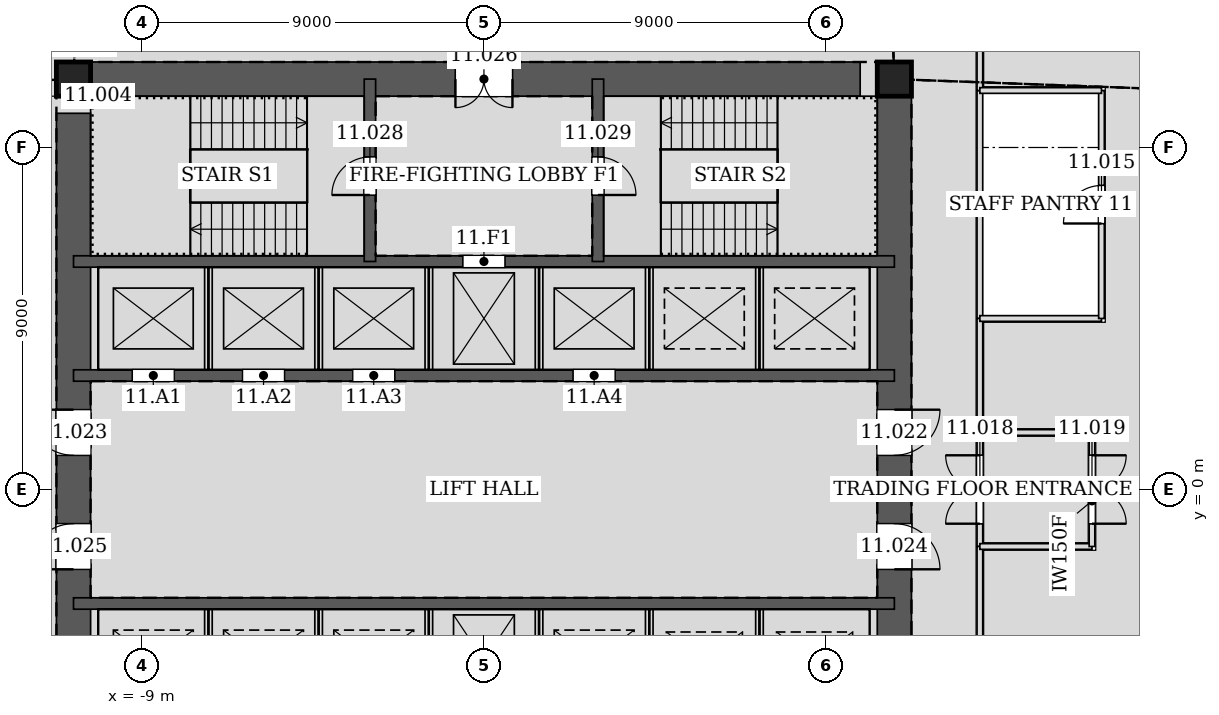
"""IFC4 building model, lengths in metres.
Left out: names, types, materials, properties, quantities, classifications, styles, units other than length and angle.
Written with IfcOpenShell. Run it as: python <this file> out.ifc"""

import sys

from ifc_helpers import new_model, si_unit, direction, frame, frame_2d, origin, origin_2d, place, context, subcontext, project, spatial, rectangle, hollow_rectangle, extrude, element, fill, save


model = new_model("IFC4")
c1 = context("Model", 3, precision=1e-05, world=origin(), true_north=direction((0.0, 1.0)))
c2 = subcontext(c1, "Body", "Model", "MODEL_VIEW")
j1 = project(units=[si_unit("LENGTHUNIT", "METRE"), si_unit("PLANEANGLEUNIT", "RADIAN")], contexts=[c1])
p1 = place(None, origin())
s1 = spatial("IfcSite", under=j1, at=p1, CompositionType="ELEMENT")
p2 = place(p1, origin())
s2 = spatial("IfcBuilding", under=s1, at=p2, CompositionType="ELEMENT")
p3 = place(p2, frame((0.0, 0.0, 54.0)))
s3 = spatial("IfcBuildingStorey", under=s2, at=p3, CompositionType="ELEMENT", Elevation=54.0)
for number, where, z_axis, x_axis in (
    (1, (10.8, 10.8, 0.0), (0.0, 0.0, 1.0), (1.0, 0.0, 0.0)),
    (2, (-10.8, 10.8, 0.0), (0.0, 0.0, 1.0), (1.0, 0.0, 0.0)),
):
    element("IfcColumn", number, at=place(p3, frame(where, z_axis=z_axis, x_axis=x_axis)), inside=s3, PredefinedType="COLUMN", context=c2, shape_type="SweptSolid", body=[
        extrude(hollow_rectangle(XDim=0.9, YDim=0.9, WallThickness=0.06, at=origin_2d()), origin(), (0.0, 0.0, 1.0), 4.2),
    ])
p4 = place(p3, frame((10.8, -10.8, 0.0), z_axis=(0.0, 0.0, 1.0), x_axis=(0.0, 1.0, 0.0)))
e3 = element("IfcWall", 3, at=p4, inside=s3, PredefinedType="SOLIDWALL", context=c2, shape_type="SweptSolid", body=[
    extrude(rectangle(XDim=21.6, YDim=0.9, at=frame_2d((10.8, 0.0))), origin(), (0.0, 0.0, 1.0), 4.2),
])
p5 = place(p4, frame((11.7, 0.0, 0.0)))
e4 = element("IfcOpeningElement", 4, at=p5, cuts=e3, PredefinedType="OPENING", context=c2, shape_type="SweptSolid", body=[
    extrude(rectangle(XDim=1.2, YDim=2.1, at=frame_2d((0.6, 1.05))), frame((0.0, 0.46, 0.0), z_axis=(0.0, -1.0, 0.0), x_axis=(1.0, 0.0, 0.0)), (0.0, 0.0, 1.0), 0.92),
])
p6 = place(p4, frame((8.7, 0.0, 0.0)))
e5 = element("IfcOpeningElement", 5, at=p6, cuts=e3, PredefinedType="OPENING", context=c2, shape_type="SweptSolid", body=[
    extrude(rectangle(XDim=1.2, YDim=2.1, at=frame_2d((0.6, 1.05))), frame((0.0, 0.46, 0.0), z_axis=(0.0, -1.0, 0.0), x_axis=(1.0, 0.0, 0.0)), (0.0, 0.0, 1.0), 0.92),
])
p7 = place(p3, frame((10.8, 10.8, 0.0), z_axis=(0.0, 0.0, 1.0), x_axis=(-1.0, 0.0, 0.0)))
e6 = element("IfcWall", 6, at=p7, inside=s3, PredefinedType="SOLIDWALL", context=c2, shape_type="SweptSolid", body=[
    extrude(rectangle(XDim=21.6, YDim=0.9, at=frame_2d((10.8, 0.0))), origin(), (0.0, 0.0, 1.0), 4.2),
])
p8 = place(p7, frame((10.05, 0.0, 0.0)))
e7 = element("IfcOpeningElement", 7, at=p8, cuts=e6, PredefinedType="OPENING", context=c2, shape_type="SweptSolid", body=[
    extrude(rectangle(XDim=1.5, YDim=2.1, at=frame_2d((0.75, 1.05))), frame((0.0, 0.46, 0.0), z_axis=(0.0, -1.0, 0.0), x_axis=(1.0, 0.0, 0.0)), (0.0, 0.0, 1.0), 0.92),
])
p9 = place(p3, frame((-10.8, 10.8, 0.0), z_axis=(0.0, 0.0, 1.0), x_axis=(0.0, -1.0, 0.0)))
e8 = element("IfcWall", 8, at=p9, inside=s3, PredefinedType="SOLIDWALL", context=c2, shape_type="SweptSolid", body=[
    extrude(rectangle(XDim=21.6, YDim=0.9, at=frame_2d((10.8, 0.0))), origin(), (0.0, 0.0, 1.0), 4.2),
])
p10 = place(p9, frame((8.7, 0.0, 0.0)))
e9 = element("IfcOpeningElement", 9, at=p10, cuts=e8, PredefinedType="OPENING", context=c2, shape_type="SweptSolid", body=[
    extrude(rectangle(XDim=1.2, YDim=2.1, at=frame_2d((0.6, 1.05))), frame((0.0, 0.46, 0.0), z_axis=(0.0, -1.0, 0.0), x_axis=(1.0, 0.0, 0.0)), (0.0, 0.0, 1.0), 0.92),
])
p11 = place(p9, frame((11.7, 0.0, 0.0)))
e10 = element("IfcOpeningElement", 10, at=p11, cuts=e8, PredefinedType="OPENING", context=c2, shape_type="SweptSolid", body=[
    extrude(rectangle(XDim=1.2, YDim=2.1, at=frame_2d((0.6, 1.05))), frame((0.0, 0.46, 0.0), z_axis=(0.0, -1.0, 0.0), x_axis=(1.0, 0.0, 0.0)), (0.0, 0.0, 1.0), 0.92),
])
p12 = place(p3, frame((-10.8, 3.0, 0.0), z_axis=(0.0, 0.0, 1.0), x_axis=(1.0, 0.0, 0.0)))
e11 = element("IfcWall", 11, at=p12, inside=s3, PredefinedType="SOLIDWALL", context=c2, shape_type="SweptSolid", body=[
    extrude(rectangle(XDim=21.6, YDim=0.3, at=frame_2d((10.8, 0.0))), origin(), (0.0, 0.0, 1.0), 4.2),
])
p13 = place(p12, frame((1.55, 0.0, 0.0)))
e12 = element("IfcOpeningElement", 12, at=p13, cuts=e11, PredefinedType="OPENING", context=c2, shape_type="SweptSolid", body=[
    extrude(rectangle(XDim=1.1, YDim=2.1, at=frame_2d((0.55, 1.05))), frame((0.0, 0.16, 0.0), z_axis=(0.0, -1.0, 0.0), x_axis=(1.0, 0.0, 0.0)), (0.0, 0.0, 1.0), 0.32),
])
p14 = place(p12, frame((4.45, 0.0, 0.0)))
e13 = element("IfcOpeningElement", 13, at=p14, cuts=e11, PredefinedType="OPENING", context=c2, shape_type="SweptSolid", body=[
    extrude(rectangle(XDim=1.1, YDim=2.1, at=frame_2d((0.55, 1.05))), frame((0.0, 0.16, 0.0), z_axis=(0.0, -1.0, 0.0), x_axis=(1.0, 0.0, 0.0)), (0.0, 0.0, 1.0), 0.32),
])
p15 = place(p12, frame((7.35, 0.0, 0.0)))
e14 = element("IfcOpeningElement", 14, at=p15, cuts=e11, PredefinedType="OPENING", context=c2, shape_type="SweptSolid", body=[
    extrude(rectangle(XDim=1.1, YDim=2.1, at=frame_2d((0.55, 1.05))), frame((0.0, 0.16, 0.0), z_axis=(0.0, -1.0, 0.0), x_axis=(1.0, 0.0, 0.0)), (0.0, 0.0, 1.0), 0.32),
])
p16 = place(p12, frame((13.15, 0.0, 0.0)))
e15 = element("IfcOpeningElement", 15, at=p16, cuts=e11, PredefinedType="OPENING", context=c2, shape_type="SweptSolid", body=[
    extrude(rectangle(XDim=1.1, YDim=2.1, at=frame_2d((0.55, 1.05))), frame((0.0, 0.16, 0.0), z_axis=(0.0, -1.0, 0.0), x_axis=(1.0, 0.0, 0.0)), (0.0, 0.0, 1.0), 0.32),
])
p17 = place(p3, frame((-10.8, 6.0, 0.0), z_axis=(0.0, 0.0, 1.0), x_axis=(1.0, 0.0, 0.0)))
e16 = element("IfcWall", 16, at=p17, inside=s3, PredefinedType="SOLIDWALL", context=c2, shape_type="SweptSolid", body=[
    extrude(rectangle(XDim=21.6, YDim=0.3, at=frame_2d((10.8, 0.0))), origin(), (0.0, 0.0, 1.0), 4.2),
])
p18 = place(p17, frame((10.25, 0.0, 0.0)))
e17 = element("IfcOpeningElement", 17, at=p18, cuts=e16, PredefinedType="OPENING", context=c2, shape_type="SweptSolid", body=[
    extrude(rectangle(XDim=1.1, YDim=2.1, at=frame_2d((0.55, 1.05))), frame((0.0, 0.16, 0.0), z_axis=(0.0, -1.0, 0.0), x_axis=(1.0, 0.0, 0.0)), (0.0, 0.0, 1.0), 0.32),
])
p19 = place(p3, frame((-3.0, 6.0, 0.0), z_axis=(0.0, 0.0, 1.0), x_axis=(0.0, 1.0, 0.0)))
e18 = element("IfcWall", 18, at=p19, inside=s3, PredefinedType="SOLIDWALL", context=c2, shape_type="SweptSolid", body=[
    extrude(rectangle(XDim=4.8, YDim=0.3, at=frame_2d((2.4, 0.0))), origin(), (0.0, 0.0, 1.0), 4.2),
])
p20 = place(p19, frame((1.75, 0.0, 0.0)))
e19 = element("IfcOpeningElement", 19, at=p20, cuts=e18, PredefinedType="OPENING", context=c2, shape_type="SweptSolid", body=[
    extrude(rectangle(XDim=1.0, YDim=2.1, at=frame_2d((0.5, 1.05))), frame((0.0, 0.16, 0.0), z_axis=(0.0, -1.0, 0.0), x_axis=(1.0, 0.0, 0.0)), (0.0, 0.0, 1.0), 0.32),
])
p21 = place(p3, frame((3.0, 6.0, 0.0), z_axis=(0.0, 0.0, 1.0), x_axis=(0.0, 1.0, 0.0)))
e20 = element("IfcWall", 20, at=p21, inside=s3, PredefinedType="SOLIDWALL", context=c2, shape_type="SweptSolid", body=[
    extrude(rectangle(XDim=4.8, YDim=0.3, at=frame_2d((2.4, 0.0))), origin(), (0.0, 0.0, 1.0), 4.2),
])
p22 = place(p21, frame((1.75, 0.0, 0.0)))
e21 = element("IfcOpeningElement", 21, at=p22, cuts=e20, PredefinedType="OPENING", context=c2, shape_type="SweptSolid", body=[
    extrude(rectangle(XDim=1.0, YDim=2.1, at=frame_2d((0.5, 1.05))), frame((0.0, 0.16, 0.0), z_axis=(0.0, -1.0, 0.0), x_axis=(1.0, 0.0, 0.0)), (0.0, 0.0, 1.0), 0.32),
])
p23 = place(p3, frame((-10.8, -3.0, 0.0), z_axis=(0.0, 0.0, 1.0), x_axis=(1.0, 0.0, 0.0)))
e22 = element("IfcWall", 22, at=p23, inside=s3, PredefinedType="SOLIDWALL", context=c2, shape_type="SweptSolid", body=[
    extrude(rectangle(XDim=21.6, YDim=0.3, at=frame_2d((10.8, 0.0))), origin(), (0.0, 0.0, 1.0), 4.2),
])
p24 = place(p3, frame((13.05, 4.499, 0.0), z_axis=(0.0, 0.0, 1.0), x_axis=(0.0, 1.0, 0.0)))
e23 = element("IfcWall", 23, at=p24, inside=s3, PredefinedType="PARTITIONING", context=c2, shape_type="SweptSolid", body=[
    extrude(rectangle(XDim=6.002, YDim=0.15, at=frame_2d((3.001, 0.0))), origin(), (0.0, 0.0, 1.0), 3.014),
])
p25 = place(p3, frame((13.05, -1.501, 0.0), z_axis=(0.0, 0.0, 1.0), x_axis=(0.0, 1.0, 0.0)))
e24 = element("IfcWall", 24, at=p25, inside=s3, PredefinedType="PARTITIONING", context=c2, shape_type="SweptSolid", body=[
    extrude(rectangle(XDim=3.002, YDim=0.15, at=frame_2d((1.501, 0.0))), origin(), (0.0, 0.0, 1.0), 2.984),
])
p26 = place(p25, frame((0.601, 0.0, 0.0)))
e25 = element("IfcOpeningElement", 25, at=p26, cuts=e24, PredefinedType="OPENING", context=c2, shape_type="SweptSolid", body=[
    extrude(rectangle(XDim=1.8, YDim=2.4, at=frame_2d((0.9, 1.2))), frame((0.0, 0.085, 0.0), z_axis=(0.0, -1.0, 0.0), x_axis=(1.0, 0.0, 0.0)), (0.0, 0.0, 1.0), 0.17),
])
p27 = place(p3, frame((13.05, 10.499, 0.0), z_axis=(0.0, 0.0, 1.0), x_axis=(0.0, 1.0, 0.0)))
e26 = element("IfcWall", 26, at=p27, inside=s3, PredefinedType="PARTITIONING", context=c2, shape_type="SweptSolid", body=[
    extrude(rectangle(XDim=2.551, YDim=0.15, at=frame_2d((1.275, 0.0))), origin(), (0.0, 0.0, 1.0), 3.014),
])
p28 = place(p3, frame((13.05, -13.05, 0.0), z_axis=(0.0, 0.0, 1.0), x_axis=(0.0, 1.0, 0.0)))
e27 = element("IfcWall", 27, at=p28, inside=s3, PredefinedType="PARTITIONING", context=c2, shape_type="SweptSolid", body=[
    extrude(rectangle(XDim=11.551, YDim=0.15, at=frame_2d((5.775, 0.0))), origin(), (0.0, 0.0, 1.0), 3.014),
])
p29 = place(p3, frame((13.05, 1.499, 0.0), z_axis=(0.0, 0.0, 1.0), x_axis=(0.0, 1.0, 0.0)))
e28 = element("IfcWall", 28, at=p29, inside=s3, PredefinedType="PARTITIONING", context=c2, shape_type="SweptSolid", body=[
    extrude(rectangle(XDim=3.002, YDim=0.15, at=frame_2d((1.501, 0.0))), origin(), (0.0, 0.0, 1.0), 4.035),
])
p30 = place(p3, frame((13.05, 4.5, 0.0), z_axis=(0.0, 0.0, 1.0), x_axis=(1.0, 0.0, 0.0)))
e29 = element("IfcWall", 29, at=p30, inside=s3, PredefinedType="PARTITIONING", context=c2, shape_type="SweptSolid", body=[
    extrude(rectangle(XDim=3.2, YDim=0.15, at=frame_2d((1.6, 0.0))), origin(), (0.0, 0.0, 1.0), 3.423),
])
p31 = place(p3, frame((16.25, 4.5, 0.0), z_axis=(0.0, 0.0, 1.0), x_axis=(0.0, 1.0, 0.0)))
e30 = element("IfcWall", 30, at=p31, inside=s3, PredefinedType="PARTITIONING", context=c2, shape_type="SweptSolid", body=[
    extrude(rectangle(XDim=6.0, YDim=0.15, at=frame_2d((3.0, 0.0))), origin(), (0.0, 0.0, 1.0), 3.014),
])
p32 = place(p31, frame((2.5, 0.0, 0.0)))
e31 = element("IfcOpeningElement", 31, at=p32, cuts=e30, PredefinedType="OPENING", context=c2, shape_type="SweptSolid", body=[
    extrude(rectangle(XDim=1.0, YDim=2.1, at=frame_2d((0.5, 1.05))), frame((0.0, 0.085, 0.0), z_axis=(0.0, -1.0, 0.0), x_axis=(1.0, 0.0, 0.0)), (0.0, 0.0, 1.0), 0.17),
])
p33 = place(p3, frame((16.25, 10.5, 0.0), z_axis=(0.0, 0.0, 1.0), x_axis=(-1.0, 0.0, 0.0)))
e32 = element("IfcWall", 32, at=p33, inside=s3, PredefinedType="PARTITIONING", context=c2, shape_type="SweptSolid", body=[
    extrude(rectangle(XDim=3.2, YDim=0.15, at=frame_2d((1.6, 0.0))), origin(), (0.0, 0.0, 1.0), 3.014),
])
p34 = place(p3, frame((13.05, -1.5, 0.0), z_axis=(0.0, 0.0, 1.0), x_axis=(1.0, 0.0, 0.0)))
e33 = element("IfcWall", 33, at=p34, inside=s3, PredefinedType="PARTITIONING", context=c2, shape_type="SweptSolid", body=[
    extrude(rectangle(XDim=2.95, YDim=0.15, at=frame_2d((1.475, 0.0))), origin(), (0.0, 0.0, 1.0), 3.423),
])
p35 = place(p3, frame((16.0, -1.5, 0.0), z_axis=(0.0, 0.0, 1.0), x_axis=(0.0, 1.0, 0.0)))
e34 = element("IfcWall", 34, at=p35, inside=s3, PredefinedType="PARTITIONING", context=c2, shape_type="SweptSolid", body=[
    extrude(rectangle(XDim=3.0, YDim=0.15, at=frame_2d((1.5, 0.0))), origin(), (0.0, 0.0, 1.0), 2.984),
])
p36 = place(p35, frame((0.6, 0.0, 0.0)))
e35 = element("IfcOpeningElement", 35, at=p36, cuts=e34, PredefinedType="OPENING", context=c2, shape_type="SweptSolid", body=[
    extrude(rectangle(XDim=1.8, YDim=2.4, at=frame_2d((0.9, 1.2))), frame((0.0, 0.085, 0.0), z_axis=(0.0, -1.0, 0.0), x_axis=(1.0, 0.0, 0.0)), (0.0, 0.0, 1.0), 0.17),
])
p37 = place(p3, frame((16.0, 1.5, 0.0), z_axis=(0.0, 0.0, 1.0), x_axis=(-1.0, 0.0, 0.0)))
e36 = element("IfcWall", 36, at=p37, inside=s3, PredefinedType="PARTITIONING", context=c2, shape_type="SweptSolid", body=[
    extrude(rectangle(XDim=2.95, YDim=0.15, at=frame_2d((1.475, 0.0))), origin(), (0.0, 0.0, 1.0), 3.423),
])
for number, where, z_axis, x_axis in (
    (37, (-7.25, 3.15, 0.0), (0.0, 0.0, 1.0), (0.0, 1.0, 0.0)),
    (38, (-4.35, 3.15, 0.0), (0.0, 0.0, 1.0), (0.0, 1.0, 0.0)),
    (39, (-1.45, 3.15, 0.0), (0.0, 0.0, 1.0), (0.0, 1.0, 0.0)),
    (40, (1.45, 3.15, 0.0), (0.0, 0.0, 1.0), (0.0, 1.0, 0.0)),
    (41, (4.35, 3.15, 0.0), (0.0, 0.0, 1.0), (0.0, 1.0, 0.0)),
    (42, (7.25, 3.15, 0.0), (0.0, 0.0, 1.0), (0.0, 1.0, 0.0)),
    (43, (-7.25, -5.85, 0.0), (0.0, 0.0, 1.0), (0.0, 1.0, 0.0)),
    (44, (-4.35, -5.85, 0.0), (0.0, 0.0, 1.0), (0.0, 1.0, 0.0)),
    (45, (-1.45, -5.85, 0.0), (0.0, 0.0, 1.0), (0.0, 1.0, 0.0)),
    (46, (1.45, -5.85, 0.0), (0.0, 0.0, 1.0), (0.0, 1.0, 0.0)),
    (47, (4.35, -5.85, 0.0), (0.0, 0.0, 1.0), (0.0, 1.0, 0.0)),
    (48, (7.25, -5.85, 0.0), (0.0, 0.0, 1.0), (0.0, 1.0, 0.0)),
):
    element("IfcWall", number, at=place(p3, frame(where, z_axis=z_axis, x_axis=x_axis)), inside=s3, PredefinedType="PARTITIONING", context=c2, shape_type="SweptSolid", body=[
        extrude(rectangle(XDim=2.7, YDim=0.2, at=frame_2d((1.35, 0.0))), origin(), (0.0, 0.0, 1.0), 4.2),
    ])
p38 = place(p32, origin())
e49 = element("IfcDoor", 49, at=p38, inside=s3, OperationType="SINGLE_SWING_LEFT", PredefinedType="DOOR", context=c2, shape_type="SweptSolid", body=[
    extrude(rectangle(XDim=1.0, YDim=2.1, at=frame_2d((0.5, 1.05))), frame((0.0, 0.025, 0.0), z_axis=(0.0, -1.0, 0.0), x_axis=(1.0, 0.0, 0.0)), (0.0, 0.0, 1.0), 0.05),
])
fill(e31, e49)
p39 = place(p26, origin())
e50 = element("IfcDoor", 50, at=p39, inside=s3, OperationType="DOUBLE_DOOR_SINGLE_SWING", PredefinedType="DOOR", context=c2, shape_type="SweptSolid", body=[
    extrude(rectangle(XDim=1.8, YDim=2.4, at=frame_2d((0.9, 1.2))), frame((0.0, 0.025, 0.0), z_axis=(0.0, -1.0, 0.0), x_axis=(1.0, 0.0, 0.0)), (0.0, 0.0, 1.0), 0.05),
])
fill(e25, e50)
p40 = place(p36, frame((1.8, 0.0, 0.0), z_axis=(0.0, 0.0, 1.0), x_axis=(-1.0, 0.0, 0.0)))
e51 = element("IfcDoor", 51, at=p40, inside=s3, OperationType="DOUBLE_DOOR_SINGLE_SWING", PredefinedType="DOOR", context=c2, shape_type="SweptSolid", body=[
    extrude(rectangle(XDim=1.8, YDim=2.4, at=frame_2d((0.9, 1.2))), frame((0.0, 0.025, 0.0), z_axis=(0.0, -1.0, 0.0), x_axis=(1.0, 0.0, 0.0)), (0.0, 0.0, 1.0), 0.05),
])
fill(e35, e51)
p41 = place(p5, frame((1.2, 0.0, 0.0), z_axis=(0.0, 0.0, 1.0), x_axis=(-1.0, 0.0, 0.0)))
e52 = element("IfcDoor", 52, at=p41, inside=s3, OperationType="SINGLE_SWING_LEFT", PredefinedType="DOOR", context=c2, shape_type="SweptSolid", body=[
    extrude(rectangle(XDim=1.2, YDim=2.1, at=frame_2d((0.6, 1.05))), frame((0.0, 0.025, 0.0), z_axis=(0.0, -1.0, 0.0), x_axis=(1.0, 0.0, 0.0)), (0.0, 0.0, 1.0), 0.05),
])
fill(e4, e52)
p42 = place(p10, frame((1.2, 0.0, 0.0), z_axis=(0.0, 0.0, 1.0), x_axis=(-1.0, 0.0, 0.0)))
e53 = element("IfcDoor", 53, at=p42, inside=s3, OperationType="SINGLE_SWING_RIGHT", PredefinedType="DOOR", context=c2, shape_type="SweptSolid", body=[
    extrude(rectangle(XDim=1.2, YDim=2.1, at=frame_2d((0.6, 1.05))), frame((0.0, 0.025, 0.0), z_axis=(0.0, -1.0, 0.0), x_axis=(1.0, 0.0, 0.0)), (0.0, 0.0, 1.0), 0.05),
])
fill(e9, e53)
p43 = place(p6, frame((1.2, 0.0, 0.0), z_axis=(0.0, 0.0, 1.0), x_axis=(-1.0, 0.0, 0.0)))
e54 = element("IfcDoor", 54, at=p43, inside=s3, OperationType="SINGLE_SWING_RIGHT", PredefinedType="DOOR", context=c2, shape_type="SweptSolid", body=[
    extrude(rectangle(XDim=1.2, YDim=2.1, at=frame_2d((0.6, 1.05))), frame((0.0, 0.025, 0.0), z_axis=(0.0, -1.0, 0.0), x_axis=(1.0, 0.0, 0.0)), (0.0, 0.0, 1.0), 0.05),
])
fill(e5, e54)
p44 = place(p11, frame((1.2, 0.0, 0.0), z_axis=(0.0, 0.0, 1.0), x_axis=(-1.0, 0.0, 0.0)))
e55 = element("IfcDoor", 55, at=p44, inside=s3, OperationType="SINGLE_SWING_LEFT", PredefinedType="DOOR", context=c2, shape_type="SweptSolid", body=[
    extrude(rectangle(XDim=1.2, YDim=2.1, at=frame_2d((0.6, 1.05))), frame((0.0, 0.025, 0.0), z_axis=(0.0, -1.0, 0.0), x_axis=(1.0, 0.0, 0.0)), (0.0, 0.0, 1.0), 0.05),
])
fill(e10, e55)
p45 = place(p8, origin())
e56 = element("IfcDoor", 56, at=p45, inside=s3, OperationType="DOUBLE_DOOR_SINGLE_SWING", PredefinedType="DOOR", context=c2, shape_type="SweptSolid", body=[
    extrude(rectangle(XDim=1.5, YDim=2.1, at=frame_2d((0.75, 1.05))), frame((0.0, 0.025, 0.0), z_axis=(0.0, -1.0, 0.0), x_axis=(1.0, 0.0, 0.0)), (0.0, 0.0, 1.0), 0.05),
])
fill(e7, e56)
p46 = place(p20, origin())
e57 = element("IfcDoor", 57, at=p46, inside=s3, OperationType="SINGLE_SWING_LEFT", PredefinedType="DOOR", context=c2, shape_type="SweptSolid", body=[
    extrude(rectangle(XDim=1.0, YDim=2.1, at=frame_2d((0.5, 1.05))), frame((0.0, 0.025, 0.0), z_axis=(0.0, -1.0, 0.0), x_axis=(1.0, 0.0, 0.0)), (0.0, 0.0, 1.0), 0.05),
])
fill(e19, e57)
p47 = place(p22, frame((1.0, 0.0, 0.0), z_axis=(0.0, 0.0, 1.0), x_axis=(-1.0, 0.0, 0.0)))
e58 = element("IfcDoor", 58, at=p47, inside=s3, OperationType="SINGLE_SWING_RIGHT", PredefinedType="DOOR", context=c2, shape_type="SweptSolid", body=[
    extrude(rectangle(XDim=1.0, YDim=2.1, at=frame_2d((0.5, 1.05))), frame((0.0, 0.025, 0.0), z_axis=(0.0, -1.0, 0.0), x_axis=(1.0, 0.0, 0.0)), (0.0, 0.0, 1.0), 0.05),
])
fill(e21, e58)
p48 = place(p13, origin())
e59 = element("IfcDoor", 59, at=p48, inside=s3, OperationType="DOUBLE_DOOR_SLIDING", PredefinedType="DOOR", context=c2, shape_type="SweptSolid", body=[
    extrude(rectangle(XDim=1.1, YDim=2.1, at=frame_2d((0.55, 1.05))), frame((0.0, 0.025, 0.0), z_axis=(0.0, -1.0, 0.0), x_axis=(1.0, 0.0, 0.0)), (0.0, 0.0, 1.0), 0.05),
])
fill(e12, e59)
p49 = place(p14, origin())
e60 = element("IfcDoor", 60, at=p49, inside=s3, OperationType="DOUBLE_DOOR_SLIDING", PredefinedType="DOOR", context=c2, shape_type="SweptSolid", body=[
    extrude(rectangle(XDim=1.1, YDim=2.1, at=frame_2d((0.55, 1.05))), frame((0.0, 0.025, 0.0), z_axis=(0.0, -1.0, 0.0), x_axis=(1.0, 0.0, 0.0)), (0.0, 0.0, 1.0), 0.05),
])
fill(e13, e60)
p50 = place(p15, origin())
e61 = element("IfcDoor", 61, at=p50, inside=s3, OperationType="DOUBLE_DOOR_SLIDING", PredefinedType="DOOR", context=c2, shape_type="SweptSolid", body=[
    extrude(rectangle(XDim=1.1, YDim=2.1, at=frame_2d((0.55, 1.05))), frame((0.0, 0.025, 0.0), z_axis=(0.0, -1.0, 0.0), x_axis=(1.0, 0.0, 0.0)), (0.0, 0.0, 1.0), 0.05),
])
fill(e14, e61)
p51 = place(p18, origin())
e62 = element("IfcDoor", 62, at=p51, inside=s3, OperationType="DOUBLE_DOOR_SLIDING", PredefinedType="DOOR", context=c2, shape_type="SweptSolid", body=[
    extrude(rectangle(XDim=1.1, YDim=2.1, at=frame_2d((0.55, 1.05))), frame((0.0, 0.025, 0.0), z_axis=(0.0, -1.0, 0.0), x_axis=(1.0, 0.0, 0.0)), (0.0, 0.0, 1.0), 0.05),
])
fill(e17, e62)
p52 = place(p16, origin())
e63 = element("IfcDoor", 63, at=p52, inside=s3, OperationType="DOUBLE_DOOR_SLIDING", PredefinedType="DOOR", context=c2, shape_type="SweptSolid", body=[
    extrude(rectangle(XDim=1.1, YDim=2.1, at=frame_2d((0.55, 1.05))), frame((0.0, 0.025, 0.0), z_axis=(0.0, -1.0, 0.0), x_axis=(1.0, 0.0, 0.0)), (0.0, 0.0, 1.0), 0.05),
])
fill(e15, e63)
save(model, sys.argv[1])
